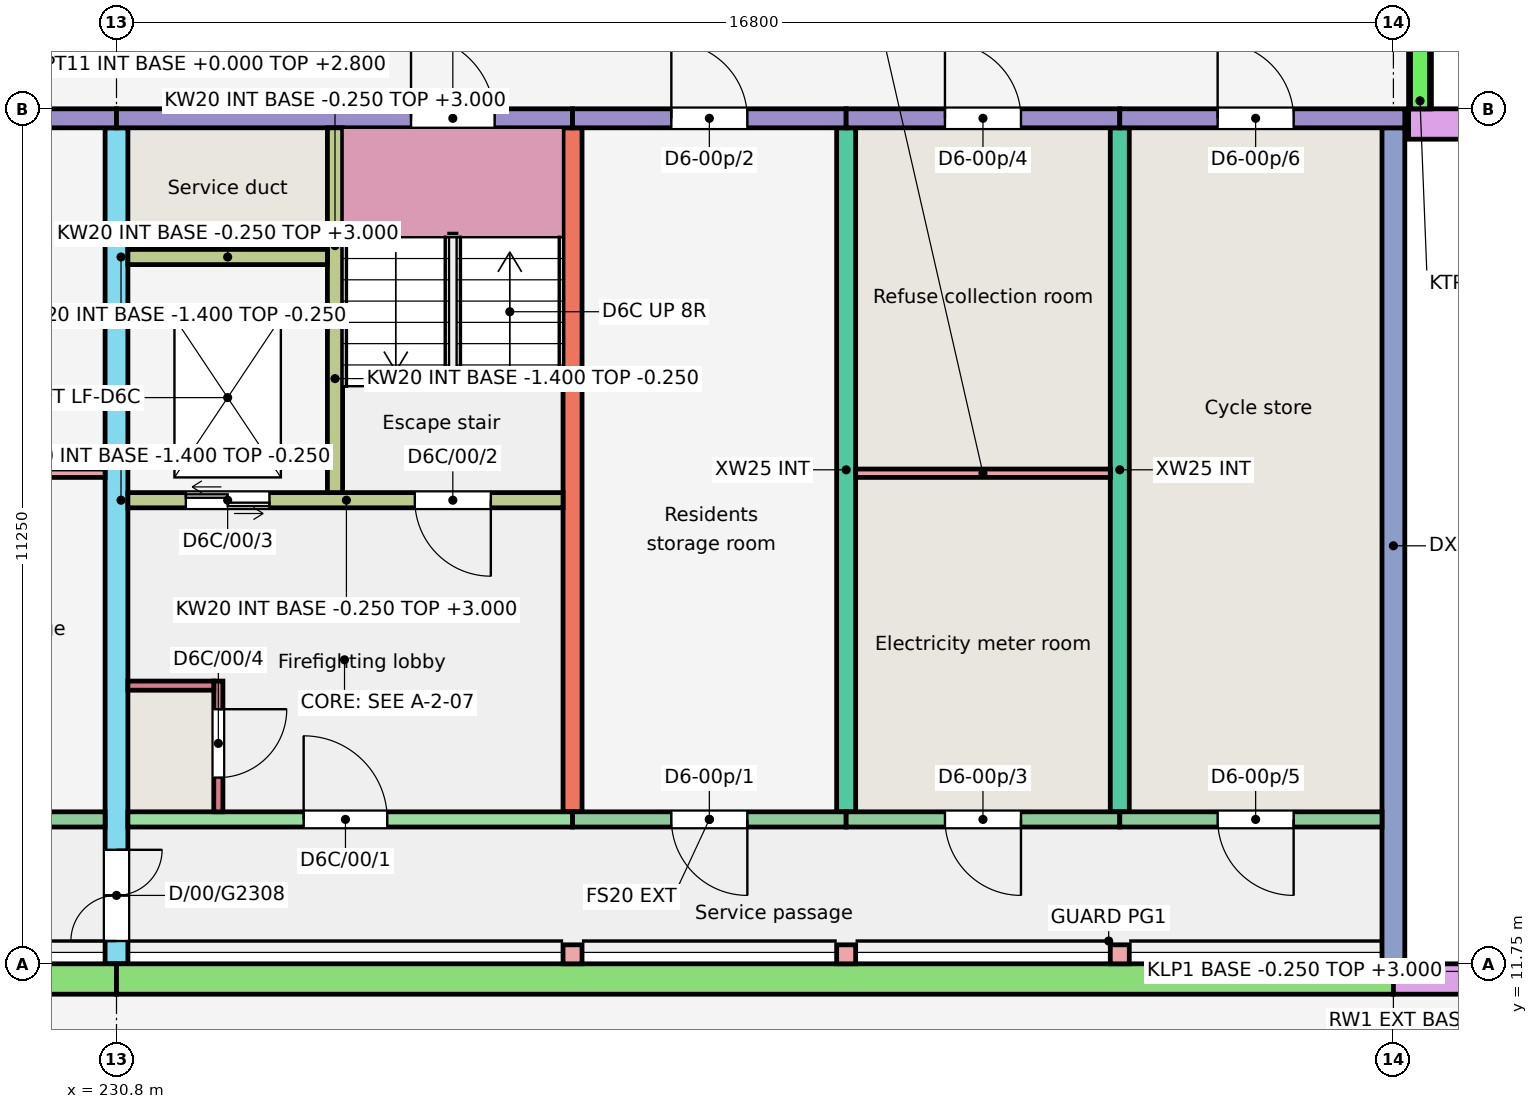
"""IFC4 building model, lengths in metres.
Left out: names, types, materials, properties, quantities, classifications, styles, units other than length and angle.
Written with IfcOpenShell. Run it as: python <this file> out.ifc"""

import sys

from ifc_helpers import new_model, si_unit, direction, frame, frame_2d, origin, origin_2d, place, context, subcontext, project, spatial, rectangle, extrude, element, fill, save


model = new_model("IFC4")
c1 = context("Model", 3, precision=1e-05, world=origin(), true_north=direction((0.0, 1.0)))
c2 = subcontext(c1, "Body", "Model", "MODEL_VIEW")
j1 = project(units=[si_unit("LENGTHUNIT", "METRE"), si_unit("PLANEANGLEUNIT", "RADIAN")], contexts=[c1])
p1 = place(None, origin())
s1 = spatial("IfcSite", under=j1, at=p1, CompositionType="ELEMENT")
p2 = place(p1, origin())
s2 = spatial("IfcBuilding", under=s1, at=p2, CompositionType="ELEMENT")
p3 = place(p2, origin())
s3 = spatial("IfcBuildingStorey", under=s2, at=p3, CompositionType="ELEMENT", Elevation=0.0)
p4 = place(p3, frame((230.8, 11.75, -0.25), z_axis=(0.0, 0.0, 1.0), x_axis=(0.0, 1.0, 0.0)))
e1 = element("IfcWall", 1, at=p4, inside=s3, PredefinedType="SHEAR", context=c2, shape_type="SweptSolid", body=[
    extrude(rectangle(XDim=11.0, YDim=0.3, at=frame_2d((5.5, 0.0))), origin(), (0.0, 0.0, 1.0), 3.25),
])
p5 = place(p4, frame((0.3, 0.0, 0.25)))
e2 = element("IfcOpeningElement", 2, at=p5, cuts=e1, PredefinedType="OPENING", context=c2, shape_type="SweptSolid", body=[
    extrude(rectangle(XDim=1.2, YDim=2.1, at=frame_2d((0.6, 1.05))), frame((0.0, 0.16, 0.0), z_axis=(0.0, -1.0, 0.0), x_axis=(1.0, 0.0, 0.0)), (0.0, 0.0, 1.0), 0.32),
])
for number, where, z_axis, x_axis in (
    (3, (236.8, 13.75, -0.25), (0.0, 0.0, 1.0), (0.0, 1.0, 0.0)),
    (4, (240.4, 13.75, -0.25), (0.0, 0.0, 1.0), (0.0, 1.0, 0.0)),
    (5, (244.0, 13.75, -0.25), (0.0, 0.0, 1.0), (0.0, 1.0, 0.0)),
):
    element("IfcWall", number, at=place(p3, frame(where, z_axis=z_axis, x_axis=x_axis)), inside=s3, PredefinedType="SHEAR", context=c2, shape_type="SweptSolid", body=[
        extrude(rectangle(XDim=9.0, YDim=0.25, at=frame_2d((4.5, 0.0))), origin(), (0.0, 0.0, 1.0), 3.25),
    ])
p6 = place(p3, frame((247.6, 11.75, -0.25), z_axis=(0.0, 0.0, 1.0), x_axis=(0.0, 1.0, 0.0)))
e6 = element("IfcWall", 6, at=p6, inside=s3, PredefinedType="SHEAR", context=c2, shape_type="SweptSolid", body=[
    extrude(rectangle(XDim=11.0, YDim=0.3, at=frame_2d((5.5, 0.0))), origin(), (0.0, 0.0, 1.0), 3.25),
])
p7 = place(p3, frame((227.2, 22.875, -0.25), z_axis=(0.0, 0.0, 1.0), x_axis=(1.0, 0.0, 0.0)))
e7 = element("IfcWall", 7, at=p7, inside=s3, PredefinedType="SOLIDWALL", context=c2, shape_type="SweptSolid", body=[
    extrude(rectangle(XDim=3.6, YDim=0.25, at=frame_2d((1.8, 0.0))), origin(), (0.0, 0.0, 1.0), 3.25),
])
p8 = place(p7, frame((1.288, 0.0, 0.25)))
e8 = element("IfcOpeningElement", 8, at=p8, cuts=e7, PredefinedType="OPENING", context=c2, shape_type="SweptSolid", body=[
    extrude(rectangle(XDim=1.0, YDim=2.1, at=frame_2d((0.5, 1.05))), frame((0.0, 0.135, 0.0), z_axis=(0.0, -1.0, 0.0), x_axis=(1.0, 0.0, 0.0)), (0.0, 0.0, 1.0), 0.27),
])
p9 = place(p3, frame((227.2, 13.65, -0.25), z_axis=(0.0, 0.0, 1.0), x_axis=(1.0, 0.0, 0.0)))
e9 = element("IfcWall", 9, at=p9, inside=s3, PredefinedType="SOLIDWALL", context=c2, shape_type="SweptSolid", body=[
    extrude(rectangle(XDim=3.45, YDim=0.2, at=frame_2d((1.725, 0.0))), origin(), (0.0, 0.0, 1.0), 3.25),
])
p10 = place(p9, frame((1.288, 0.0, 0.25)))
e10 = element("IfcOpeningElement", 10, at=p10, cuts=e9, PredefinedType="OPENING", context=c2, shape_type="SweptSolid", body=[
    extrude(rectangle(XDim=1.0, YDim=2.1, at=frame_2d((0.5, 1.05))), frame((0.0, 0.11, 0.0), z_axis=(0.0, -1.0, 0.0), x_axis=(1.0, 0.0, 0.0)), (0.0, 0.0, 1.0), 0.22),
])
p11 = place(p3, frame((230.8, 22.875, -0.25), z_axis=(0.0, 0.0, 1.0), x_axis=(1.0, 0.0, 0.0)))
e11 = element("IfcWall", 11, at=p11, inside=s3, PredefinedType="SOLIDWALL", context=c2, shape_type="SweptSolid", body=[
    extrude(rectangle(XDim=6.0, YDim=0.25, at=frame_2d((3.0, 0.0))), origin(), (0.0, 0.0, 1.0), 3.25),
])
p12 = place(p11, frame((3.875, 0.0, 0.25)))
e12 = element("IfcOpeningElement", 12, at=p12, cuts=e11, PredefinedType="OPENING", context=c2, shape_type="SweptSolid", body=[
    extrude(rectangle(XDim=1.1, YDim=2.1, at=frame_2d((0.55, 1.05))), frame((0.0, 0.135, 0.0), z_axis=(0.0, -1.0, 0.0), x_axis=(1.0, 0.0, 0.0)), (0.0, 0.0, 1.0), 0.27),
])
p13 = place(p3, frame((230.95, 13.65, -0.25), z_axis=(0.0, 0.0, 1.0), x_axis=(1.0, 0.0, 0.0)))
e13 = element("IfcWall", 13, at=p13, inside=s3, PredefinedType="SHEAR", context=c2, shape_type="SweptSolid", body=[
    extrude(rectangle(XDim=5.85, YDim=0.2, at=frame_2d((2.925, 0.0))), origin(), (0.0, 0.0, 1.0), 3.25),
])
p14 = place(p13, frame((2.312, 0.0, 0.25)))
e14 = element("IfcOpeningElement", 14, at=p14, cuts=e13, PredefinedType="OPENING", context=c2, shape_type="SweptSolid", body=[
    extrude(rectangle(XDim=1.1, YDim=2.1, at=frame_2d((0.55, 1.05))), frame((0.0, 0.11, 0.0), z_axis=(0.0, -1.0, 0.0), x_axis=(1.0, 0.0, 0.0)), (0.0, 0.0, 1.0), 0.22),
])
p15 = place(p3, frame((230.95, 17.85, -0.25), z_axis=(0.0, 0.0, 1.0), x_axis=(1.0, 0.0, 0.0)))
e15 = element("IfcWall", 15, at=p15, inside=s3, PredefinedType="SHEAR", context=c2, shape_type="SweptSolid", body=[
    extrude(rectangle(XDim=5.725, YDim=0.2, at=frame_2d((2.863, 0.0))), origin(), (0.0, 0.0, 1.0), 3.25),
])
p16 = place(p15, frame((3.775, 0.0, 0.25)))
e16 = element("IfcOpeningElement", 16, at=p16, cuts=e15, PredefinedType="OPENING", context=c2, shape_type="SweptSolid", body=[
    extrude(rectangle(XDim=1.0, YDim=2.1, at=frame_2d((0.5, 1.05))), frame((0.0, 0.11, 0.0), z_axis=(0.0, -1.0, 0.0), x_axis=(1.0, 0.0, 0.0)), (0.0, 0.0, 1.0), 0.22),
])
p17 = place(p15, frame((0.762, 0.0, 0.25)))
e17 = element("IfcOpeningElement", 17, at=p17, cuts=e15, PredefinedType="OPENING", context=c2, shape_type="SweptSolid", body=[
    extrude(rectangle(XDim=1.1, YDim=2.1, at=frame_2d((0.55, 1.05))), frame((0.0, 0.11, 0.0), z_axis=(0.0, -1.0, 0.0), x_axis=(1.0, 0.0, 0.0)), (0.0, 0.0, 1.0), 0.22),
])
p18 = place(p3, frame((233.675, 17.95, -0.25), z_axis=(0.0, 0.0, 1.0), x_axis=(0.0, 1.0, 0.0)))
e18 = element("IfcWall", 18, at=p18, inside=s3, PredefinedType="SHEAR", context=c2, shape_type="SweptSolid", body=[
    extrude(rectangle(XDim=4.8, YDim=0.2, at=frame_2d((2.4, 0.0))), origin(), (0.0, 0.0, 1.0), 3.25),
])
p19 = place(p3, frame((230.95, 21.05, -0.25), z_axis=(0.0, 0.0, 1.0), x_axis=(1.0, 0.0, 0.0)))
e19 = element("IfcWall", 19, at=p19, inside=s3, PredefinedType="SHEAR", context=c2, shape_type="SweptSolid", body=[
    extrude(rectangle(XDim=2.625, YDim=0.2, at=frame_2d((1.312, 0.0))), origin(), (0.0, 0.0, 1.0), 3.25),
])
p20 = place(p3, frame((232.14, 13.75, -0.25), z_axis=(0.0, 0.0, 1.0), x_axis=(0.0, 1.0, 0.0)))
e20 = element("IfcWall", 20, at=p20, inside=s3, PredefinedType="SHEAR", context=c2, shape_type="SweptSolid", body=[
    extrude(rectangle(XDim=1.72, YDim=0.12, at=frame_2d((0.86, 0.0))), origin(), (0.0, 0.0, 1.0), 3.25),
])
p21 = place(p20, frame((0.45, 0.0, 0.25)))
e21 = element("IfcOpeningElement", 21, at=p21, cuts=e20, PredefinedType="OPENING", context=c2, shape_type="SweptSolid", body=[
    extrude(rectangle(XDim=0.9, YDim=2.1, at=frame_2d((0.45, 1.05))), frame((0.0, 0.07, 0.0), z_axis=(0.0, -1.0, 0.0), x_axis=(1.0, 0.0, 0.0)), (0.0, 0.0, 1.0), 0.14),
])
p22 = place(p3, frame((230.95, 15.41, -0.25), z_axis=(0.0, 0.0, 1.0), x_axis=(1.0, 0.0, 0.0)))
e22 = element("IfcWall", 22, at=p22, inside=s3, PredefinedType="SHEAR", context=c2, shape_type="SweptSolid", body=[
    extrude(rectangle(XDim=1.13, YDim=0.12, at=frame_2d((0.565, 0.0))), origin(), (0.0, 0.0, 1.0), 3.25),
])
p23 = place(p3, frame((236.8, 22.875, -0.25), z_axis=(0.0, 0.0, 1.0), x_axis=(1.0, 0.0, 0.0)))
e23 = element("IfcWall", 23, at=p23, inside=s3, PredefinedType="SOLIDWALL", context=c2, shape_type="SweptSolid", body=[
    extrude(rectangle(XDim=3.6, YDim=0.25, at=frame_2d((1.8, 0.0))), origin(), (0.0, 0.0, 1.0), 3.25),
])
p24 = place(p23, frame((1.3, 0.0, 0.25)))
e24 = element("IfcOpeningElement", 24, at=p24, cuts=e23, PredefinedType="OPENING", context=c2, shape_type="SweptSolid", body=[
    extrude(rectangle(XDim=1.0, YDim=2.1, at=frame_2d((0.5, 1.05))), frame((0.0, 0.135, 0.0), z_axis=(0.0, -1.0, 0.0), x_axis=(1.0, 0.0, 0.0)), (0.0, 0.0, 1.0), 0.27),
])
p25 = place(p3, frame((236.8, 13.65, -0.25), z_axis=(0.0, 0.0, 1.0), x_axis=(1.0, 0.0, 0.0)))
e25 = element("IfcWall", 25, at=p25, inside=s3, PredefinedType="SOLIDWALL", context=c2, shape_type="SweptSolid", body=[
    extrude(rectangle(XDim=3.6, YDim=0.2, at=frame_2d((1.8, 0.0))), origin(), (0.0, 0.0, 1.0), 3.25),
])
p26 = place(p25, frame((1.3, 0.0, 0.25)))
e26 = element("IfcOpeningElement", 26, at=p26, cuts=e25, PredefinedType="OPENING", context=c2, shape_type="SweptSolid", body=[
    extrude(rectangle(XDim=1.0, YDim=2.1, at=frame_2d((0.5, 1.05))), frame((0.0, 0.11, 0.0), z_axis=(0.0, -1.0, 0.0), x_axis=(1.0, 0.0, 0.0)), (0.0, 0.0, 1.0), 0.22),
])
p27 = place(p3, frame((240.4, 22.875, -0.25), z_axis=(0.0, 0.0, 1.0), x_axis=(1.0, 0.0, 0.0)))
e27 = element("IfcWall", 27, at=p27, inside=s3, PredefinedType="SOLIDWALL", context=c2, shape_type="SweptSolid", body=[
    extrude(rectangle(XDim=3.6, YDim=0.25, at=frame_2d((1.8, 0.0))), origin(), (0.0, 0.0, 1.0), 3.25),
])
p28 = place(p27, frame((1.3, 0.0, 0.25)))
e28 = element("IfcOpeningElement", 28, at=p28, cuts=e27, PredefinedType="OPENING", context=c2, shape_type="SweptSolid", body=[
    extrude(rectangle(XDim=1.0, YDim=2.1, at=frame_2d((0.5, 1.05))), frame((0.0, 0.135, 0.0), z_axis=(0.0, -1.0, 0.0), x_axis=(1.0, 0.0, 0.0)), (0.0, 0.0, 1.0), 0.27),
])
p29 = place(p3, frame((240.4, 13.65, -0.25), z_axis=(0.0, 0.0, 1.0), x_axis=(1.0, 0.0, 0.0)))
e29 = element("IfcWall", 29, at=p29, inside=s3, PredefinedType="SOLIDWALL", context=c2, shape_type="SweptSolid", body=[
    extrude(rectangle(XDim=3.6, YDim=0.2, at=frame_2d((1.8, 0.0))), origin(), (0.0, 0.0, 1.0), 3.25),
])
p30 = place(p29, frame((1.3, 0.0, 0.25)))
e30 = element("IfcOpeningElement", 30, at=p30, cuts=e29, PredefinedType="OPENING", context=c2, shape_type="SweptSolid", body=[
    extrude(rectangle(XDim=1.0, YDim=2.1, at=frame_2d((0.5, 1.05))), frame((0.0, 0.11, 0.0), z_axis=(0.0, -1.0, 0.0), x_axis=(1.0, 0.0, 0.0)), (0.0, 0.0, 1.0), 0.22),
])
p31 = place(p3, frame((244.0, 22.875, -0.25), z_axis=(0.0, 0.0, 1.0), x_axis=(1.0, 0.0, 0.0)))
e31 = element("IfcWall", 31, at=p31, inside=s3, PredefinedType="SOLIDWALL", context=c2, shape_type="SweptSolid", body=[
    extrude(rectangle(XDim=3.75, YDim=0.25, at=frame_2d((1.875, 0.0))), origin(), (0.0, 0.0, 1.0), 3.25),
])
p32 = place(p31, frame((1.288, 0.0, 0.25)))
e32 = element("IfcOpeningElement", 32, at=p32, cuts=e31, PredefinedType="OPENING", context=c2, shape_type="SweptSolid", body=[
    extrude(rectangle(XDim=1.0, YDim=2.1, at=frame_2d((0.5, 1.05))), frame((0.0, 0.135, 0.0), z_axis=(0.0, -1.0, 0.0), x_axis=(1.0, 0.0, 0.0)), (0.0, 0.0, 1.0), 0.27),
])
p33 = place(p3, frame((244.0, 13.65, -0.25), z_axis=(0.0, 0.0, 1.0), x_axis=(1.0, 0.0, 0.0)))
e33 = element("IfcWall", 33, at=p33, inside=s3, PredefinedType="SOLIDWALL", context=c2, shape_type="SweptSolid", body=[
    extrude(rectangle(XDim=3.45, YDim=0.2, at=frame_2d((1.725, 0.0))), origin(), (0.0, 0.0, 1.0), 3.25),
])
p34 = place(p33, frame((1.288, 0.0, 0.25)))
e34 = element("IfcOpeningElement", 34, at=p34, cuts=e33, PredefinedType="OPENING", context=c2, shape_type="SweptSolid", body=[
    extrude(rectangle(XDim=1.0, YDim=2.1, at=frame_2d((0.5, 1.05))), frame((0.0, 0.11, 0.0), z_axis=(0.0, -1.0, 0.0), x_axis=(1.0, 0.0, 0.0)), (0.0, 0.0, 1.0), 0.22),
])
for number, where, z_axis, x_axis in (
    (35, (236.8, 11.875, -0.25), (0.0, 0.0, 1.0), (1.0, 0.0, 0.0)),
    (36, (240.4, 11.875, -0.25), (0.0, 0.0, 1.0), (1.0, 0.0, 0.0)),
    (37, (244.0, 11.875, -0.25), (0.0, 0.0, 1.0), (1.0, 0.0, 0.0)),
):
    element("IfcColumn", number, at=place(p3, frame(where, z_axis=z_axis, x_axis=x_axis)), inside=s3, PredefinedType="COLUMN", context=c2, shape_type="SweptSolid", body=[
        extrude(rectangle(XDim=0.25, YDim=0.25, at=origin_2d()), origin(), (0.0, 0.0, 1.0), 3.25),
    ])
for number, where, z_axis, x_axis in (
    (38, (230.8, 17.85, -1.4), (0.0, 0.0, 1.0), (1.0, 0.0, 0.0)),
    (39, (230.8, 21.05, -1.4), (0.0, 0.0, 1.0), (1.0, 0.0, 0.0)),
):
    element("IfcWall", number, at=place(p3, frame(where, z_axis=z_axis, x_axis=x_axis)), inside=s3, PredefinedType="SHEAR", context=c2, shape_type="SweptSolid", body=[
        extrude(rectangle(XDim=2.975, YDim=0.2, at=frame_2d((1.487, 0.0))), origin(), (0.0, 0.0, 1.0), 1.15),
    ])
p35 = place(p3, frame((233.675, 17.95, -1.4), z_axis=(0.0, 0.0, 1.0), x_axis=(0.0, 1.0, 0.0)))
e40 = element("IfcWall", 40, at=p35, inside=s3, PredefinedType="SHEAR", context=c2, shape_type="SweptSolid", body=[
    extrude(rectangle(XDim=3.0, YDim=0.2, at=frame_2d((1.5, 0.0))), origin(), (0.0, 0.0, 1.0), 1.15),
])
p36 = place(p3, frame((230.875, 17.95, -1.4), z_axis=(0.0, 0.0, 1.0), x_axis=(0.0, 1.0, 0.0)))
e41 = element("IfcWall", 41, at=p36, inside=s3, PredefinedType="SHEAR", context=c2, shape_type="SweptSolid", body=[
    extrude(rectangle(XDim=3.0, YDim=0.15, at=frame_2d((1.5, 0.0))), origin(), (0.0, 0.0, 1.0), 1.15),
])
for number, where, z_axis, x_axis in (
    (42, (214.0, 11.55, -0.25), (0.0, 0.0, 1.0), (1.0, 0.0, 0.0)),
    (43, (230.8, 11.55, -0.25), (0.0, 0.0, 1.0), (1.0, 0.0, 0.0)),
):
    element("IfcWall", number, at=place(p3, frame(where, z_axis=z_axis, x_axis=x_axis)), inside=s3, PredefinedType="SOLIDWALL", context=c2, shape_type="SweptSolid", body=[
        extrude(rectangle(XDim=16.8, YDim=0.4, at=frame_2d((8.4, 0.0))), origin(), (0.0, 0.0, 1.0), 3.25),
    ])
p37 = place(p3, frame((247.8, 22.8, -0.25), z_axis=(0.0, 0.0, 1.0), x_axis=(1.0, 0.0, 0.0)))
e44 = element("IfcWall", 44, at=p37, inside=s3, PredefinedType="SOLIDWALL", context=c2, shape_type="SweptSolid", body=[
    extrude(rectangle(XDim=6.15, YDim=0.4, at=frame_2d((3.075, 0.0))), origin(), (0.0, 0.0, 1.0), 3.25),
])
p38 = place(p3, frame((247.6, 11.55, -0.25), z_axis=(0.0, 0.0, 1.0), x_axis=(1.0, 0.0, 0.0)))
e45 = element("IfcWall", 45, at=p38, inside=s3, PredefinedType="SOLIDWALL", context=c2, shape_type="SweptSolid", body=[
    extrude(rectangle(XDim=2.7, YDim=0.4, at=frame_2d((1.35, 0.0))), origin(), (0.0, 0.0, 1.0), 6.25),
])
p39 = place(p3, frame((247.95, 23.0, -0.25), z_axis=(0.0, 0.0, 1.0), x_axis=(0.0, 1.0, 0.0)))
e46 = element("IfcWall", 46, at=p39, inside=s3, PredefinedType="SOLIDWALL", context=c2, shape_type="SweptSolid", body=[
    extrude(rectangle(XDim=10.5, YDim=0.3, at=frame_2d((5.25, 0.0))), origin(), (0.0, 0.0, 1.0), 2.5),
])
p40 = place(p3, frame((247.95, 23.0, 2.25), z_axis=(0.0, 0.0, 1.0), x_axis=(0.0, 1.0, 0.0)))
e47 = element("IfcWall", 47, at=p40, inside=s3, PredefinedType="PARAPET", context=c2, shape_type="SweptSolid", body=[
    extrude(rectangle(XDim=10.5, YDim=0.25, at=frame_2d((5.25, 0.0))), origin(), (0.0, 0.0, 1.0), 1.1),
])
p41 = place(p3, frame((227.325, 18.205, 0.0), z_axis=(0.0, 0.0, 1.0), x_axis=(1.0, 0.0, 0.0)))
e48 = element("IfcWall", 48, at=p41, inside=s3, PredefinedType="PARTITIONING", context=c2, shape_type="SweptSolid", body=[
    extrude(rectangle(XDim=3.325, YDim=0.11, at=frame_2d((1.663, 0.0))), origin(), (0.0, 0.0, 1.0), 2.8),
])
p42 = place(p3, frame((240.525, 18.205, 0.0), z_axis=(0.0, 0.0, 1.0), x_axis=(1.0, 0.0, 0.0)))
e49 = element("IfcWall", 49, at=p42, inside=s3, PredefinedType="PARTITIONING", context=c2, shape_type="SweptSolid", body=[
    extrude(rectangle(XDim=3.35, YDim=0.11, at=frame_2d((1.675, 0.0))), origin(), (0.0, 0.0, 1.0), 2.8),
])
p43 = place(p26, origin())
e50 = element("IfcDoor", 50, at=p43, inside=s3, OperationType="SINGLE_SWING_RIGHT", PredefinedType="DOOR", context=c2, shape_type="SweptSolid", body=[
    extrude(rectangle(XDim=1.0, YDim=2.1, at=frame_2d((0.5, 1.05))), frame((0.0, 0.025, 0.0), z_axis=(0.0, -1.0, 0.0), x_axis=(1.0, 0.0, 0.0)), (0.0, 0.0, 1.0), 0.05),
])
fill(e26, e50)
p44 = place(p24, origin())
e51 = element("IfcDoor", 51, at=p44, inside=s3, OperationType="SINGLE_SWING_LEFT", PredefinedType="DOOR", context=c2, shape_type="SweptSolid", body=[
    extrude(rectangle(XDim=1.0, YDim=2.1, at=frame_2d((0.5, 1.05))), frame((0.0, 0.025, 0.0), z_axis=(0.0, -1.0, 0.0), x_axis=(1.0, 0.0, 0.0)), (0.0, 0.0, 1.0), 0.05),
])
fill(e24, e51)
p45 = place(p30, origin())
e52 = element("IfcDoor", 52, at=p45, inside=s3, OperationType="SINGLE_SWING_RIGHT", PredefinedType="DOOR", context=c2, shape_type="SweptSolid", body=[
    extrude(rectangle(XDim=1.0, YDim=2.1, at=frame_2d((0.5, 1.05))), frame((0.0, 0.025, 0.0), z_axis=(0.0, -1.0, 0.0), x_axis=(1.0, 0.0, 0.0)), (0.0, 0.0, 1.0), 0.05),
])
fill(e30, e52)
p46 = place(p28, origin())
e53 = element("IfcDoor", 53, at=p46, inside=s3, OperationType="SINGLE_SWING_LEFT", PredefinedType="DOOR", context=c2, shape_type="SweptSolid", body=[
    extrude(rectangle(XDim=1.0, YDim=2.1, at=frame_2d((0.5, 1.05))), frame((0.0, 0.025, 0.0), z_axis=(0.0, -1.0, 0.0), x_axis=(1.0, 0.0, 0.0)), (0.0, 0.0, 1.0), 0.05),
])
fill(e28, e53)
p47 = place(p34, origin())
e54 = element("IfcDoor", 54, at=p47, inside=s3, OperationType="SINGLE_SWING_RIGHT", PredefinedType="DOOR", context=c2, shape_type="SweptSolid", body=[
    extrude(rectangle(XDim=1.0, YDim=2.1, at=frame_2d((0.5, 1.05))), frame((0.0, 0.025, 0.0), z_axis=(0.0, -1.0, 0.0), x_axis=(1.0, 0.0, 0.0)), (0.0, 0.0, 1.0), 0.05),
])
fill(e34, e54)
p48 = place(p32, origin())
e55 = element("IfcDoor", 55, at=p48, inside=s3, OperationType="SINGLE_SWING_LEFT", PredefinedType="DOOR", context=c2, shape_type="SweptSolid", body=[
    extrude(rectangle(XDim=1.0, YDim=2.1, at=frame_2d((0.5, 1.05))), frame((0.0, 0.025, 0.0), z_axis=(0.0, -1.0, 0.0), x_axis=(1.0, 0.0, 0.0)), (0.0, 0.0, 1.0), 0.05),
])
fill(e32, e55)
p49 = place(p14, origin())
e56 = element("IfcDoor", 56, at=p49, inside=s3, OperationType="SINGLE_SWING_LEFT", PredefinedType="DOOR", context=c2, shape_type="SweptSolid", body=[
    extrude(rectangle(XDim=1.1, YDim=2.1, at=frame_2d((0.55, 1.05))), frame((0.0, 0.025, 0.0), z_axis=(0.0, -1.0, 0.0), x_axis=(1.0, 0.0, 0.0)), (0.0, 0.0, 1.0), 0.05),
])
fill(e14, e56)
p50 = place(p16, origin())
e57 = element("IfcDoor", 57, at=p50, inside=s3, OperationType="SINGLE_SWING_RIGHT", PredefinedType="DOOR", context=c2, shape_type="SweptSolid", body=[
    extrude(rectangle(XDim=1.0, YDim=2.1, at=frame_2d((0.5, 1.05))), frame((0.0, 0.025, 0.0), z_axis=(0.0, -1.0, 0.0), x_axis=(1.0, 0.0, 0.0)), (0.0, 0.0, 1.0), 0.05),
])
fill(e16, e57)
p51 = place(p17, origin())
e58 = element("IfcDoor", 58, at=p51, inside=s3, OperationType="DOUBLE_DOOR_SLIDING", PredefinedType="DOOR", context=c2, shape_type="SweptSolid", body=[
    extrude(rectangle(XDim=1.1, YDim=2.1, at=frame_2d((0.55, 1.05))), frame((0.0, 0.025, 0.0), z_axis=(0.0, -1.0, 0.0), x_axis=(1.0, 0.0, 0.0)), (0.0, 0.0, 1.0), 0.05),
])
fill(e17, e58)
p52 = place(p21, origin())
e59 = element("IfcDoor", 59, at=p52, inside=s3, OperationType="SINGLE_SWING_RIGHT", PredefinedType="DOOR", context=c2, shape_type="SweptSolid", body=[
    extrude(rectangle(XDim=0.9, YDim=2.1, at=frame_2d((0.45, 1.05))), frame((0.0, 0.025, 0.0), z_axis=(0.0, -1.0, 0.0), x_axis=(1.0, 0.0, 0.0)), (0.0, 0.0, 1.0), 0.05),
])
fill(e21, e59)
p53 = place(p12, origin())
e60 = element("IfcDoor", 60, at=p53, inside=s3, OperationType="SINGLE_SWING_LEFT", PredefinedType="DOOR", context=c2, shape_type="SweptSolid", body=[
    extrude(rectangle(XDim=1.1, YDim=2.1, at=frame_2d((0.55, 1.05))), frame((0.0, 0.025, 0.0), z_axis=(0.0, -1.0, 0.0), x_axis=(1.0, 0.0, 0.0)), (0.0, 0.0, 1.0), 0.05),
])
fill(e12, e60)
p54 = place(p5, origin())
e61 = element("IfcDoor", 61, at=p54, inside=s3, OperationType="DOUBLE_DOOR_SINGLE_SWING", PredefinedType="DOOR", context=c2, shape_type="SweptSolid", body=[
    extrude(rectangle(XDim=1.2, YDim=2.1, at=frame_2d((0.6, 1.05))), frame((0.0, 0.025, 0.0), z_axis=(0.0, -1.0, 0.0), x_axis=(1.0, 0.0, 0.0)), (0.0, 0.0, 1.0), 0.05),
])
fill(e2, e61)
save(model, sys.argv[1])
